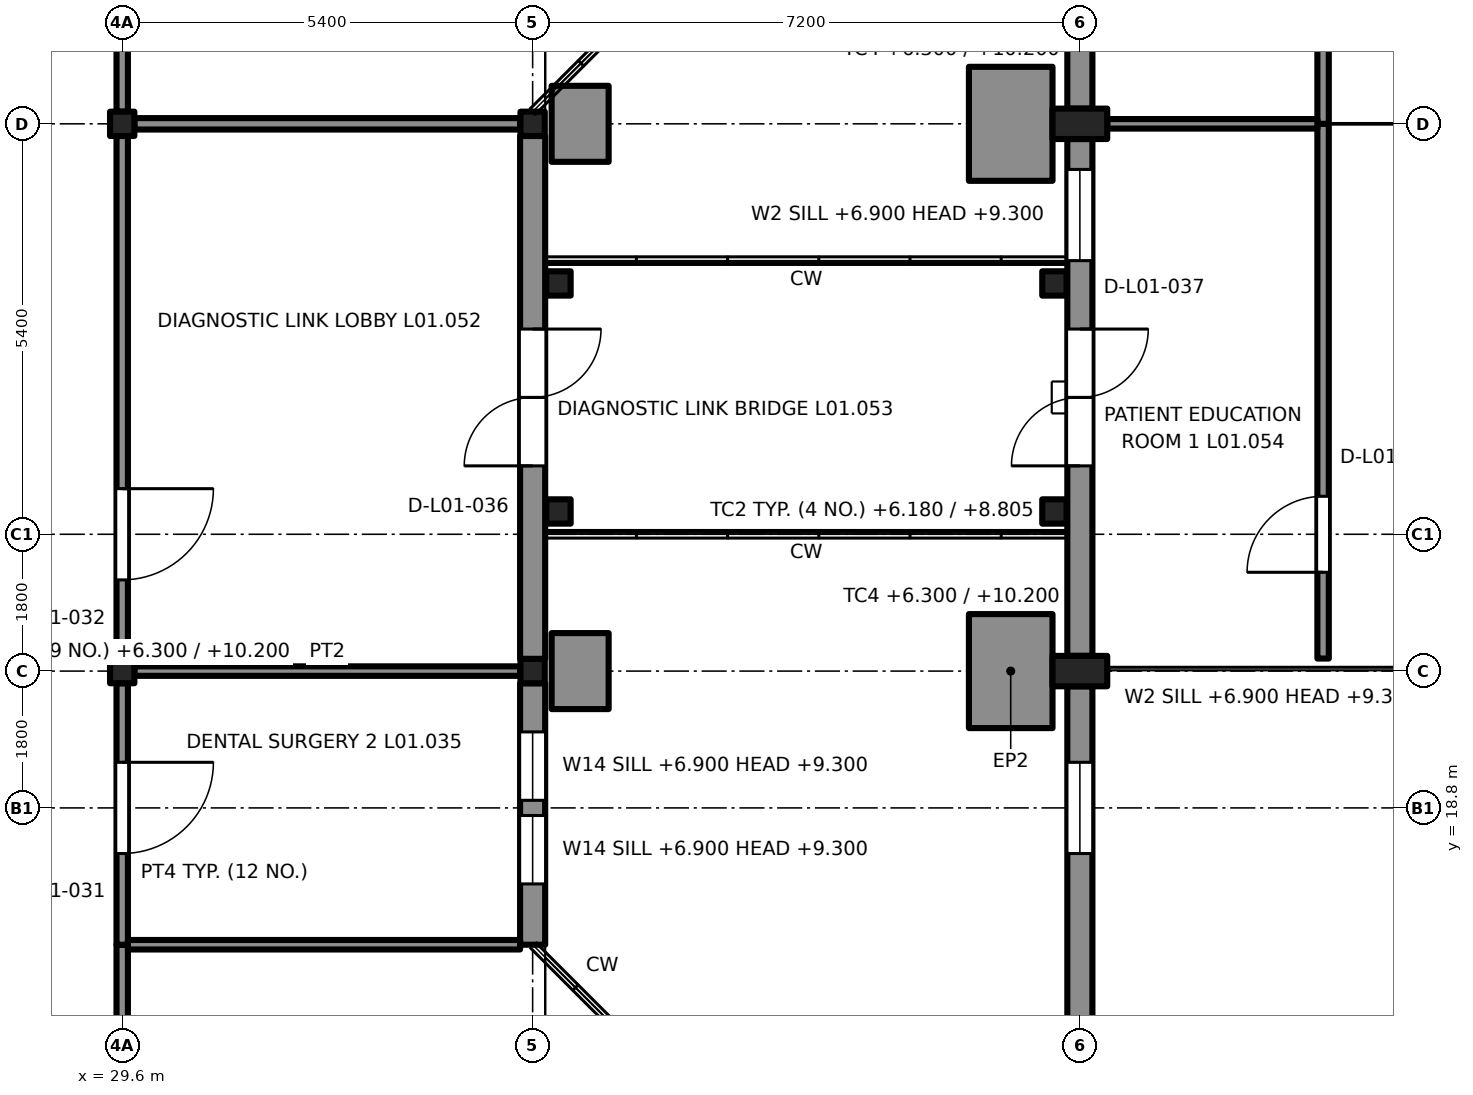
"""IFC4 building model, lengths in metres.
Left out: names, types, materials, properties, quantities, classifications, styles, units other than length and angle.
Written with IfcOpenShell. Run it as: python <this file> out.ifc"""

import sys

from ifc_helpers import new_model, si_unit, direction, frame, frame_2d, origin, origin_2d, place, context, subcontext, project, spatial, rectangle, extrude, element, fill, save


model = new_model("IFC4")
c1 = context("Model", 3, precision=1e-05, world=origin(), true_north=direction((0.0, 1.0)))
c2 = subcontext(c1, "Body", "Model", "MODEL_VIEW")
j1 = project(units=[si_unit("LENGTHUNIT", "METRE"), si_unit("PLANEANGLEUNIT", "RADIAN")], contexts=[c1])
p1 = place(None, origin())
s1 = spatial("IfcSite", under=j1, at=p1, CompositionType="ELEMENT")
p2 = place(p1, origin())
s2 = spatial("IfcBuilding", under=s1, at=p2, CompositionType="ELEMENT")
p3 = place(p2, frame((0.0, 0.0, 6.3)))
s3 = spatial("IfcBuildingStorey", under=s2, at=p3, CompositionType="ELEMENT", Elevation=6.3)
for number, where, z_axis, x_axis in (
    (1, (29.6, 20.6, 0.0), (0.0, 0.0, 1.0), (1.0, 0.0, 0.0)),
    (2, (35.0, 20.6, 0.0), (0.0, 0.0, 1.0), (1.0, 0.0, 0.0)),
    (3, (29.6, 27.8, 0.0), (0.0, 0.0, 1.0), (1.0, 0.0, 0.0)),
    (4, (35.0, 27.8, 0.0), (0.0, 0.0, 1.0), (1.0, 0.0, 0.0)),
):
    element("IfcColumn", number, at=place(p3, frame(where, z_axis=z_axis, x_axis=x_axis)), inside=s3, PredefinedType="COLUMN", context=c2, shape_type="SweptSolid", body=[
        extrude(rectangle(XDim=0.32, YDim=0.32, at=origin_2d()), origin(), (0.0, 0.0, 1.0), 3.9),
    ])
for number, where, z_axis, x_axis in (
    (5, (42.2, 20.6, 0.0), (0.0, 0.0, 1.0), (0.0, 1.0, 0.0)),
    (6, (42.2, 27.8, 0.0), (0.0, 0.0, 1.0), (0.0, 1.0, 0.0)),
):
    element("IfcColumn", number, at=place(p3, frame(where, z_axis=z_axis, x_axis=x_axis)), inside=s3, PredefinedType="COLUMN", context=c2, shape_type="SweptSolid", body=[
        extrude(rectangle(XDim=0.4, YDim=0.72, at=origin_2d()), origin(), (0.0, 0.0, 1.0), 3.9),
    ])
for number, where, z_axis, x_axis in (
    (7, (35.34, 22.7, -0.12), (0.0, 0.0, 1.0), (1.0, 0.0, 0.0)),
    (8, (35.34, 25.7, -0.12), (0.0, 0.0, 1.0), (1.0, 0.0, 0.0)),
    (9, (41.865, 22.7, -0.12), (0.0, 0.0, 1.0), (1.0, 0.0, 0.0)),
    (10, (41.865, 25.7, -0.12), (0.0, 0.0, 1.0), (1.0, 0.0, 0.0)),
):
    element("IfcColumn", number, at=place(p3, frame(where, z_axis=z_axis, x_axis=x_axis)), inside=s3, PredefinedType="COLUMN", context=c2, shape_type="SweptSolid", body=[
        extrude(rectangle(XDim=0.32, YDim=0.32, at=origin_2d()), origin(), (0.0, 0.0, 1.0), 2.625),
    ])
p4 = place(p3, frame((35.0, 20.44, 0.0), z_axis=(0.0, 0.0, 1.0), x_axis=(0.0, -1.0, 0.0)))
e11 = element("IfcWall", 11, at=p4, inside=s3, PredefinedType="SOLIDWALL", context=c2, shape_type="SweptSolid", body=[
    extrude(rectangle(XDim=3.44, YDim=0.33, at=frame_2d((1.72, 0.0))), origin(), (0.0, 0.0, 1.0), 3.22),
])
p5 = place(p4, frame((1.74, 0.0, 0.6)))
e12 = element("IfcOpeningElement", 12, at=p5, cuts=e11, PredefinedType="OPENING", context=c2, shape_type="SweptSolid", body=[
    extrude(rectangle(XDim=0.9, YDim=2.4, at=frame_2d((0.45, 1.2))), frame((0.0, 0.175, 0.0), z_axis=(0.0, -1.0, 0.0), x_axis=(1.0, 0.0, 0.0)), (0.0, 0.0, 1.0), 0.35),
])
p6 = place(p4, frame((0.64, 0.0, 0.6)))
e13 = element("IfcOpeningElement", 13, at=p6, cuts=e11, PredefinedType="OPENING", context=c2, shape_type="SweptSolid", body=[
    extrude(rectangle(XDim=0.9, YDim=2.4, at=frame_2d((0.45, 1.2))), frame((0.0, 0.175, 0.0), z_axis=(0.0, -1.0, 0.0), x_axis=(1.0, 0.0, 0.0)), (0.0, 0.0, 1.0), 0.35),
])
p7 = place(p3, frame((35.0, 27.64, 0.0), z_axis=(0.0, 0.0, 1.0), x_axis=(0.0, -1.0, 0.0)))
e14 = element("IfcWall", 14, at=p7, inside=s3, PredefinedType="SOLIDWALL", context=c2, shape_type="SweptSolid", body=[
    extrude(rectangle(XDim=6.88, YDim=0.33, at=frame_2d((3.44, 0.0))), origin(), (0.0, 0.0, 1.0), 3.22),
])
p8 = place(p7, frame((2.54, 0.0, 0.0)))
e15 = element("IfcOpeningElement", 15, at=p8, cuts=e14, PredefinedType="OPENING", context=c2, shape_type="SweptSolid", body=[
    extrude(rectangle(XDim=1.8, YDim=2.4, at=frame_2d((0.9, 1.2))), frame((0.0, 0.175, 0.0), z_axis=(0.0, -1.0, 0.0), x_axis=(1.0, 0.0, 0.0)), (0.0, 0.0, 1.0), 0.35),
])
for number, where, z_axis, x_axis in (
    (16, (35.625, 21.1, 0.0), (0.0, 0.0, 1.0), (0.0, -1.0, 0.0)),
    (17, (35.625, 28.3, 0.0), (0.0, 0.0, 1.0), (0.0, -1.0, 0.0)),
):
    element("IfcWall", number, at=place(p3, frame(where, z_axis=z_axis, x_axis=x_axis)), inside=s3, PredefinedType="SOLIDWALL", context=c2, shape_type="SweptSolid", body=[
        extrude(rectangle(XDim=1.0, YDim=0.75, at=frame_2d((0.5, 0.0))), origin(), (0.0, 0.0, 1.0), 3.9),
    ])
p9 = place(p3, frame((42.2, 13.6, 0.0), z_axis=(0.0, 0.0, 1.0), x_axis=(0.0, 1.0, 0.0)))
e18 = element("IfcWall", 18, at=p9, inside=s3, PredefinedType="SOLIDWALL", context=c2, shape_type="SweptSolid", body=[
    extrude(rectangle(XDim=6.8, YDim=0.33, at=frame_2d((3.4, 0.0))), origin(), (0.0, 0.0, 1.0), 3.3),
])
p10 = place(p9, frame((1.0, 0.0, 0.6)))
e19 = element("IfcOpeningElement", 19, at=p10, cuts=e18, PredefinedType="OPENING", context=c2, shape_type="SweptSolid", body=[
    extrude(rectangle(XDim=1.2, YDim=2.4, at=frame_2d((0.6, 1.2))), frame((0.0, 0.175, 0.0), z_axis=(0.0, -1.0, 0.0), x_axis=(1.0, 0.0, 0.0)), (0.0, 0.0, 1.0), 0.35),
])
p11 = place(p9, frame((4.6, 0.0, 0.6)))
e20 = element("IfcOpeningElement", 20, at=p11, cuts=e18, PredefinedType="OPENING", context=c2, shape_type="SweptSolid", body=[
    extrude(rectangle(XDim=1.2, YDim=2.4, at=frame_2d((0.6, 1.2))), frame((0.0, 0.175, 0.0), z_axis=(0.0, -1.0, 0.0), x_axis=(1.0, 0.0, 0.0)), (0.0, 0.0, 1.0), 0.35),
])
p12 = place(p3, frame((42.2, 20.8, 0.0), z_axis=(0.0, 0.0, 1.0), x_axis=(0.0, 1.0, 0.0)))
e21 = element("IfcWall", 21, at=p12, inside=s3, PredefinedType="SOLIDWALL", context=c2, shape_type="SweptSolid", body=[
    extrude(rectangle(XDim=6.8, YDim=0.33, at=frame_2d((3.4, 0.0))), origin(), (0.0, 0.0, 1.0), 3.3),
])
p13 = place(p12, frame((2.5, 0.0, 0.0)))
e22 = element("IfcOpeningElement", 22, at=p13, cuts=e21, PredefinedType="OPENING", context=c2, shape_type="SweptSolid", body=[
    extrude(rectangle(XDim=1.8, YDim=2.4, at=frame_2d((0.9, 1.2))), frame((0.0, 0.175, 0.0), z_axis=(0.0, -1.0, 0.0), x_axis=(1.0, 0.0, 0.0)), (0.0, 0.0, 1.0), 0.35),
])
p14 = place(p12, frame((5.2, 0.0, 0.6)))
e23 = element("IfcOpeningElement", 23, at=p14, cuts=e21, PredefinedType="OPENING", context=c2, shape_type="SweptSolid", body=[
    extrude(rectangle(XDim=1.2, YDim=2.4, at=frame_2d((0.6, 1.2))), frame((0.0, 0.175, 0.0), z_axis=(0.0, -1.0, 0.0), x_axis=(1.0, 0.0, 0.0)), (0.0, 0.0, 1.0), 0.35),
])
p15 = place(p3, frame((42.2, 28.0, 0.0), z_axis=(0.0, 0.0, 1.0), x_axis=(0.0, 1.0, 0.0)))
e24 = element("IfcWall", 24, at=p15, inside=s3, PredefinedType="SOLIDWALL", context=c2, shape_type="SweptSolid", body=[
    extrude(rectangle(XDim=6.8, YDim=0.33, at=frame_2d((3.4, 0.0))), origin(), (0.0, 0.0, 1.0), 3.3),
])
p16 = place(p15, frame((1.0, 0.0, 0.6)))
e25 = element("IfcOpeningElement", 25, at=p16, cuts=e24, PredefinedType="OPENING", context=c2, shape_type="SweptSolid", body=[
    extrude(rectangle(XDim=1.2, YDim=2.4, at=frame_2d((0.6, 1.2))), frame((0.0, 0.175, 0.0), z_axis=(0.0, -1.0, 0.0), x_axis=(1.0, 0.0, 0.0)), (0.0, 0.0, 1.0), 0.35),
])
p17 = place(p15, frame((4.6, 0.0, 0.6)))
e26 = element("IfcOpeningElement", 26, at=p17, cuts=e24, PredefinedType="OPENING", context=c2, shape_type="SweptSolid", body=[
    extrude(rectangle(XDim=1.2, YDim=2.4, at=frame_2d((0.6, 1.2))), frame((0.0, 0.175, 0.0), z_axis=(0.0, -1.0, 0.0), x_axis=(1.0, 0.0, 0.0)), (0.0, 0.0, 1.0), 0.35),
])
for number, where, z_axis, x_axis in (
    (27, (41.29, 19.85, 0.0), (0.0, 0.0, 1.0), (0.0, 1.0, 0.0)),
    (28, (41.29, 27.05, 0.0), (0.0, 0.0, 1.0), (0.0, 1.0, 0.0)),
):
    element("IfcWall", number, at=place(p3, frame(where, z_axis=z_axis, x_axis=x_axis)), inside=s3, PredefinedType="SOLIDWALL", context=c2, shape_type="SweptSolid", body=[
        extrude(rectangle(XDim=1.5, YDim=1.1, at=frame_2d((0.75, 0.0))), origin(), (0.0, 0.0, 1.0), 3.9),
    ])
p18 = place(p3, frame((29.6, 17.0, 0.0), z_axis=(0.0, 0.0, 1.0), x_axis=(0.0, -1.0, 0.0)))
e29 = element("IfcWall", 29, at=p18, inside=s3, PredefinedType="PARTITIONING", context=c2, shape_type="SweptSolid", body=[
    extrude(rectangle(XDim=3.44, YDim=0.15, at=frame_2d((1.72, 0.0))), origin(), (0.0, 0.0, 1.0), 3.22),
])
p19 = place(p18, frame((1.2, 0.0, 0.0)))
e30 = element("IfcOpeningElement", 30, at=p19, cuts=e29, PredefinedType="OPENING", context=c2, shape_type="SweptSolid", body=[
    extrude(rectangle(XDim=1.2, YDim=2.1, at=frame_2d((0.6, 1.05))), frame((0.0, 0.085, 0.0), z_axis=(0.0, -1.0, 0.0), x_axis=(1.0, 0.0, 0.0)), (0.0, 0.0, 1.0), 0.17),
])
p20 = place(p3, frame((29.6, 20.44, 0.0), z_axis=(0.0, 0.0, 1.0), x_axis=(0.0, -1.0, 0.0)))
e31 = element("IfcWall", 31, at=p20, inside=s3, PredefinedType="PARTITIONING", context=c2, shape_type="SweptSolid", body=[
    extrude(rectangle(XDim=3.44, YDim=0.15, at=frame_2d((1.72, 0.0))), origin(), (0.0, 0.0, 1.0), 3.22),
])
p21 = place(p20, frame((1.04, 0.0, 0.0)))
e32 = element("IfcOpeningElement", 32, at=p21, cuts=e31, PredefinedType="OPENING", context=c2, shape_type="SweptSolid", body=[
    extrude(rectangle(XDim=1.2, YDim=2.1, at=frame_2d((0.6, 1.05))), frame((0.0, 0.085, 0.0), z_axis=(0.0, -1.0, 0.0), x_axis=(1.0, 0.0, 0.0)), (0.0, 0.0, 1.0), 0.17),
])
p22 = place(p3, frame((34.835, 17.0, 0.0), z_axis=(0.0, 0.0, 1.0), x_axis=(-1.0, 0.0, 0.0)))
e33 = element("IfcWall", 33, at=p22, inside=s3, PredefinedType="PARTITIONING", context=c2, shape_type="SweptSolid", body=[
    extrude(rectangle(XDim=5.16, YDim=0.125, at=frame_2d((2.58, 0.0))), origin(), (0.0, 0.0, 1.0), 3.38),
])
p23 = place(p3, frame((29.6, 27.64, 0.0), z_axis=(0.0, 0.0, 1.0), x_axis=(0.0, -1.0, 0.0)))
e34 = element("IfcWall", 34, at=p23, inside=s3, PredefinedType="PARTITIONING", context=c2, shape_type="SweptSolid", body=[
    extrude(rectangle(XDim=6.88, YDim=0.15, at=frame_2d((3.44, 0.0))), origin(), (0.0, 0.0, 1.0), 3.22),
])
p24 = place(p23, frame((4.64, 0.0, 0.0)))
e35 = element("IfcOpeningElement", 35, at=p24, cuts=e34, PredefinedType="OPENING", context=c2, shape_type="SweptSolid", body=[
    extrude(rectangle(XDim=1.2, YDim=2.1, at=frame_2d((0.6, 1.05))), frame((0.0, 0.085, 0.0), z_axis=(0.0, -1.0, 0.0), x_axis=(1.0, 0.0, 0.0)), (0.0, 0.0, 1.0), 0.17),
])
p25 = place(p3, frame((34.835, 20.6, 0.0), z_axis=(0.0, 0.0, 1.0), x_axis=(-1.0, 0.0, 0.0)))
e36 = element("IfcWall", 36, at=p25, inside=s3, PredefinedType="PARTITIONING", context=c2, shape_type="SweptSolid", body=[
    extrude(rectangle(XDim=5.075, YDim=0.125, at=frame_2d((2.538, 0.0))), origin(), (0.0, 0.0, 1.0), 3.38),
])
p26 = place(p3, frame((29.6, 31.4, 0.0), z_axis=(0.0, 0.0, 1.0), x_axis=(0.0, -1.0, 0.0)))
e37 = element("IfcWall", 37, at=p26, inside=s3, PredefinedType="PARTITIONING", context=c2, shape_type="SweptSolid", body=[
    extrude(rectangle(XDim=3.44, YDim=0.15, at=frame_2d((1.72, 0.0))), origin(), (0.0, 0.0, 1.0), 3.22),
])
p27 = place(p26, frame((1.3, 0.0, 0.0)))
e38 = element("IfcOpeningElement", 38, at=p27, cuts=e37, PredefinedType="OPENING", context=c2, shape_type="SweptSolid", body=[
    extrude(rectangle(XDim=1.0, YDim=2.1, at=frame_2d((0.5, 1.05))), frame((0.0, 0.085, 0.0), z_axis=(0.0, -1.0, 0.0), x_axis=(1.0, 0.0, 0.0)), (0.0, 0.0, 1.0), 0.17),
])
p28 = place(p3, frame((34.835, 27.8, 0.0), z_axis=(0.0, 0.0, 1.0), x_axis=(-1.0, 0.0, 0.0)))
e39 = element("IfcWall", 39, at=p28, inside=s3, PredefinedType="PARTITIONING", context=c2, shape_type="SweptSolid", body=[
    extrude(rectangle(XDim=5.075, YDim=0.15, at=frame_2d((2.538, 0.0))), origin(), (0.0, 0.0, 1.0), 3.38),
])
p29 = place(p3, frame((45.4, 20.765, 0.0), z_axis=(0.0, 0.0, 1.0), x_axis=(0.0, 1.0, 0.0)))
e40 = element("IfcWall", 40, at=p29, inside=s3, PredefinedType="PARTITIONING", context=c2, shape_type="SweptSolid", body=[
    extrude(rectangle(XDim=7.035, YDim=0.15, at=frame_2d((3.518, 0.0))), origin(), (0.0, 0.0, 1.0), 6.201),
])
p30 = place(p29, frame((1.135, 0.0, 0.0)))
e41 = element("IfcOpeningElement", 41, at=p30, cuts=e40, PredefinedType="OPENING", context=c2, shape_type="SweptSolid", body=[
    extrude(rectangle(XDim=1.0, YDim=2.1, at=frame_2d((0.5, 1.05))), frame((0.0, 0.085, 0.0), z_axis=(0.0, -1.0, 0.0), x_axis=(1.0, 0.0, 0.0)), (0.0, 0.0, 1.0), 0.17),
])
p31 = place(p3, frame((45.4, 27.8, 0.0), z_axis=(0.0, 0.0, 1.0), x_axis=(0.0, 1.0, 0.0)))
e42 = element("IfcWall", 42, at=p31, inside=s3, PredefinedType="PARTITIONING", context=c2, shape_type="SweptSolid", body=[
    extrude(rectangle(XDim=7.2, YDim=0.15, at=frame_2d((3.6, 0.0))), origin(), (0.0, 0.0, 1.0), 6.201),
])
p32 = place(p31, frame((1.3, 0.0, 0.0)))
e43 = element("IfcOpeningElement", 43, at=p32, cuts=e42, PredefinedType="OPENING", context=c2, shape_type="SweptSolid", body=[
    extrude(rectangle(XDim=1.0, YDim=2.1, at=frame_2d((0.5, 1.05))), frame((0.0, 0.085, 0.0), z_axis=(0.0, -1.0, 0.0), x_axis=(1.0, 0.0, 0.0)), (0.0, 0.0, 1.0), 0.17),
])
p33 = place(p3, frame((42.56, 27.8, 0.0), z_axis=(0.0, 0.0, 1.0), x_axis=(1.0, 0.0, 0.0)))
e44 = element("IfcWall", 44, at=p33, inside=s3, PredefinedType="PARTITIONING", context=c2, shape_type="SweptSolid", body=[
    extrude(rectangle(XDim=2.765, YDim=0.125, at=frame_2d((1.382, 0.0))), origin(), (0.0, 0.0, 1.0), 3.9),
])
p34 = place(p5, origin())
e45 = element("IfcWindow", 45, at=p34, inside=s3, PartitioningType="SINGLE_PANEL", PredefinedType="WINDOW", context=c2, shape_type="SweptSolid", body=[
    extrude(rectangle(XDim=0.9, YDim=2.4, at=frame_2d((0.45, 1.2))), frame((0.0, -0.03, 0.0), z_axis=(0.0, -1.0, 0.0), x_axis=(1.0, 0.0, 0.0)), (0.0, 0.0, 1.0), 0.06),
])
fill(e12, e45)
p35 = place(p6, origin())
e46 = element("IfcWindow", 46, at=p35, inside=s3, PartitioningType="SINGLE_PANEL", PredefinedType="WINDOW", context=c2, shape_type="SweptSolid", body=[
    extrude(rectangle(XDim=0.9, YDim=2.4, at=frame_2d((0.45, 1.2))), frame((0.0, -0.03, 0.0), z_axis=(0.0, -1.0, 0.0), x_axis=(1.0, 0.0, 0.0)), (0.0, 0.0, 1.0), 0.06),
])
fill(e13, e46)
p36 = place(p8, origin())
e47 = element("IfcDoor", 47, at=p36, inside=s3, OperationType="DOUBLE_DOOR_SINGLE_SWING", PredefinedType="DOOR", context=c2, shape_type="SweptSolid", body=[
    extrude(rectangle(XDim=1.8, YDim=2.4, at=frame_2d((0.9, 1.2))), frame((0.0, 0.025, 0.0), z_axis=(0.0, -1.0, 0.0), x_axis=(1.0, 0.0, 0.0)), (0.0, 0.0, 1.0), 0.05),
])
fill(e15, e47)
p37 = place(p11, origin())
e48 = element("IfcWindow", 48, at=p37, inside=s3, PartitioningType="SINGLE_PANEL", PredefinedType="WINDOW", context=c2, shape_type="SweptSolid", body=[
    extrude(rectangle(XDim=1.2, YDim=2.4, at=frame_2d((0.6, 1.2))), frame((0.0, -0.03, 0.0), z_axis=(0.0, -1.0, 0.0), x_axis=(1.0, 0.0, 0.0)), (0.0, 0.0, 1.0), 0.06),
])
fill(e20, e48)
p38 = place(p13, origin())
e49 = element("IfcDoor", 49, at=p38, inside=s3, OperationType="DOUBLE_DOOR_SINGLE_SWING", PredefinedType="DOOR", context=c2, shape_type="SweptSolid", body=[
    extrude(rectangle(XDim=1.8, YDim=2.4, at=frame_2d((0.9, 1.2))), frame((0.0, 0.025, 0.0), z_axis=(0.0, -1.0, 0.0), x_axis=(1.0, 0.0, 0.0)), (0.0, 0.0, 1.0), 0.05),
])
fill(e22, e49)
p39 = place(p14, origin())
e50 = element("IfcWindow", 50, at=p39, inside=s3, PartitioningType="SINGLE_PANEL", PredefinedType="WINDOW", context=c2, shape_type="SweptSolid", body=[
    extrude(rectangle(XDim=1.2, YDim=2.4, at=frame_2d((0.6, 1.2))), frame((0.0, -0.03, 0.0), z_axis=(0.0, -1.0, 0.0), x_axis=(1.0, 0.0, 0.0)), (0.0, 0.0, 1.0), 0.06),
])
fill(e23, e50)
p40 = place(p21, origin())
e51 = element("IfcDoor", 51, at=p40, inside=s3, OperationType="SINGLE_SWING_LEFT", PredefinedType="DOOR", context=c2, shape_type="SweptSolid", body=[
    extrude(rectangle(XDim=1.2, YDim=2.1, at=frame_2d((0.6, 1.05))), frame((0.0, 0.025, 0.0), z_axis=(0.0, -1.0, 0.0), x_axis=(1.0, 0.0, 0.0)), (0.0, 0.0, 1.0), 0.05),
])
fill(e32, e51)
p41 = place(p24, origin())
e52 = element("IfcDoor", 52, at=p41, inside=s3, OperationType="SINGLE_SWING_RIGHT", PredefinedType="DOOR", context=c2, shape_type="SweptSolid", body=[
    extrude(rectangle(XDim=1.2, YDim=2.1, at=frame_2d((0.6, 1.05))), frame((0.0, 0.025, 0.0), z_axis=(0.0, -1.0, 0.0), x_axis=(1.0, 0.0, 0.0)), (0.0, 0.0, 1.0), 0.05),
])
fill(e35, e52)
p42 = place(p30, origin())
e53 = element("IfcDoor", 53, at=p42, inside=s3, OperationType="SINGLE_SWING_LEFT", PredefinedType="DOOR", context=c2, shape_type="SweptSolid", body=[
    extrude(rectangle(XDim=1.0, YDim=2.1, at=frame_2d((0.5, 1.05))), frame((0.0, 0.025, 0.0), z_axis=(0.0, -1.0, 0.0), x_axis=(1.0, 0.0, 0.0)), (0.0, 0.0, 1.0), 0.05),
])
fill(e41, e53)
save(model, sys.argv[1])
